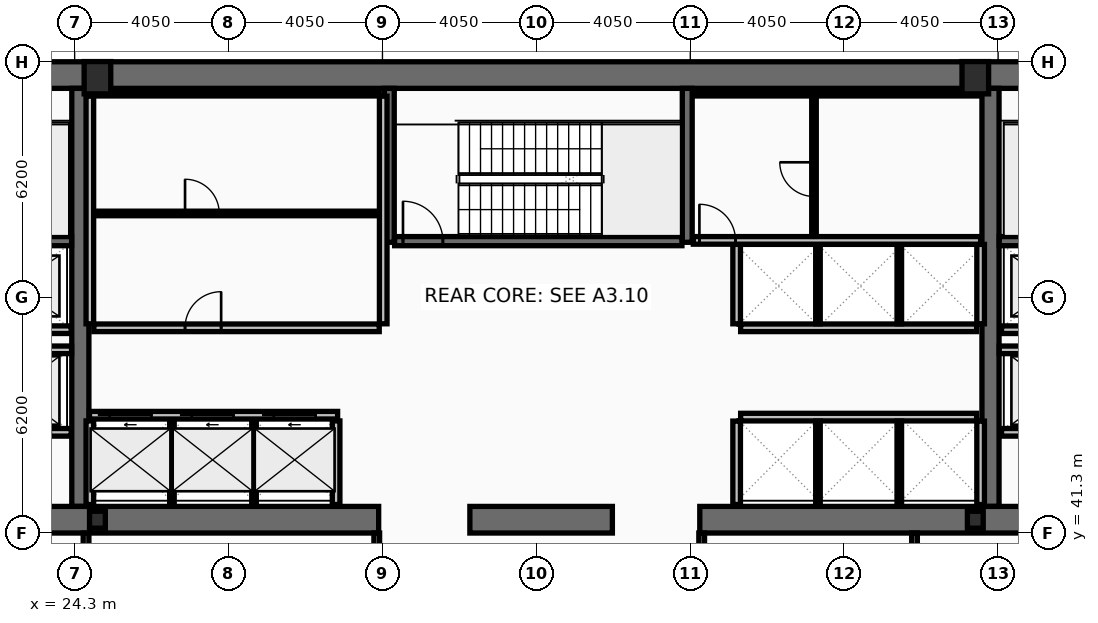
"""IFC4 building model, lengths in metres.
Left out: names, types, materials, properties, quantities, classifications, styles, units other than length and angle.
Written with IfcOpenShell. Run it as: python <this file> out.ifc"""

import sys

from ifc_helpers import new_model, si_unit, direction, frame, frame_2d, origin, origin_2d, place, context, subcontext, project, spatial, rectangle, hollow_rectangle, i_section, extrude, element, fill, save


model = new_model("IFC4")
c1 = context("Model", 3, precision=1e-05, world=origin(), true_north=direction((0.0, 1.0)))
c2 = subcontext(c1, "Body", "Model", "MODEL_VIEW")
j1 = project(units=[si_unit("LENGTHUNIT", "METRE"), si_unit("PLANEANGLEUNIT", "RADIAN")], contexts=[c1])
p1 = place(None, origin())
s1 = spatial("IfcSite", under=j1, at=p1, CompositionType="ELEMENT")
p2 = place(p1, origin())
s2 = spatial("IfcBuilding", under=s1, at=p2, CompositionType="ELEMENT")
p3 = place(p2, frame((0.0, 0.0, 172.2)))
s3 = spatial("IfcBuildingStorey", under=s2, at=p3, CompositionType="ELEMENT", Elevation=172.2)
p4 = place(p3, frame((16.2, 53.35, 0.0), z_axis=(0.0, 0.0, 1.0), x_axis=(1.0, 0.0, 0.0)))
e1 = element("IfcWall", 1, at=p4, inside=s3, PredefinedType="SHEAR", context=c2, shape_type="SweptSolid", body=[
    extrude(rectangle(XDim=40.5, YDim=0.7, at=frame_2d((20.25, 0.0))), origin(), (0.0, 0.0, 1.0), 4.64),
])
for number, where, z_axis, x_axis in (
    (2, (24.45, 42.0, 0.0), (0.0, 0.0, 1.0), (0.0, 1.0, 0.0)),
    (3, (48.4, 42.0, 0.0), (0.0, 0.0, 1.0), (0.0, 1.0, 0.0)),
):
    element("IfcWall", number, at=place(p3, frame(where, z_axis=z_axis, x_axis=x_axis)), inside=s3, PredefinedType="SHEAR", context=c2, shape_type="SweptSolid", body=[
        extrude(rectangle(XDim=11.0, YDim=0.45, at=frame_2d((5.5, 0.0))), origin(), (0.0, 0.0, 1.0), 4.64),
    ])
p5 = place(p3, frame((32.3, 41.65, 0.0), z_axis=(0.0, 0.0, 1.0), x_axis=(-1.0, 0.0, 0.0)))
e4 = element("IfcWall", 4, at=p5, inside=s3, PredefinedType="SHEAR", context=c2, shape_type="SweptSolid", body=[
    extrude(rectangle(XDim=11.45, YDim=0.7, at=frame_2d((5.725, 0.0))), origin(), (0.0, 0.0, 1.0), 4.64),
])
p6 = place(p3, frame((38.45, 41.65, 0.0), z_axis=(0.0, 0.0, 1.0), x_axis=(-1.0, 0.0, 0.0)))
e5 = element("IfcWall", 5, at=p6, inside=s3, PredefinedType="SHEAR", context=c2, shape_type="SweptSolid", body=[
    extrude(rectangle(XDim=3.75, YDim=0.7, at=frame_2d((1.875, 0.0))), origin(), (0.0, 0.0, 1.0), 4.64),
])
p7 = place(p3, frame((52.05, 41.65, 0.0), z_axis=(0.0, 0.0, 1.0), x_axis=(-1.0, 0.0, 0.0)))
e6 = element("IfcWall", 6, at=p7, inside=s3, PredefinedType="SHEAR", context=c2, shape_type="SweptSolid", body=[
    extrude(rectangle(XDim=11.3, YDim=0.7, at=frame_2d((5.65, 0.0))), origin(), (0.0, 0.0, 1.0), 4.64),
])
for number, where, z_axis, x_axis in (
    (7, (32.58, 48.95, 0.0), (0.0, 0.0, 1.0), (0.0, 1.0, 0.0)),
    (8, (40.42, 48.95, 0.0), (0.0, 0.0, 1.0), (0.0, 1.0, 0.0)),
):
    element("IfcWall", number, at=place(p3, frame(where, z_axis=z_axis, x_axis=x_axis)), inside=s3, PredefinedType="SHEAR", context=c2, shape_type="SweptSolid", body=[
        extrude(rectangle(XDim=4.05, YDim=0.26, at=frame_2d((2.025, 0.0))), origin(), (0.0, 0.0, 1.0), 4.64),
    ])
p8 = place(p3, frame((16.9, 48.98, 0.0), z_axis=(0.0, 0.0, 1.0), x_axis=(1.0, 0.0, 0.0)))
e9 = element("IfcWall", 9, at=p8, inside=s3, PredefinedType="SHEAR", context=c2, shape_type="SweptSolid", body=[
    extrude(rectangle(XDim=7.32, YDim=0.24, at=frame_2d((3.66, 0.0))), origin(), (0.0, 0.0, 1.0), 4.64),
])
p9 = place(p8, frame((0.22, 0.0, 0.0)))
e10 = element("IfcOpeningElement", 10, at=p9, cuts=e9, PredefinedType="OPENING", context=c2, shape_type="SweptSolid", body=[
    extrude(rectangle(XDim=1.05, YDim=2.15, at=frame_2d((0.525, 1.075))), frame((0.0, 0.13, 0.0), z_axis=(0.0, -1.0, 0.0), x_axis=(1.0, 0.0, 0.0)), (0.0, 0.0, 1.0), 0.26),
])
p10 = place(p3, frame((48.63, 48.98, 0.0), z_axis=(0.0, 0.0, 1.0), x_axis=(1.0, 0.0, 0.0)))
e11 = element("IfcWall", 11, at=p10, inside=s3, PredefinedType="SHEAR", context=c2, shape_type="SweptSolid", body=[
    extrude(rectangle(XDim=7.37, YDim=0.24, at=frame_2d((3.685, 0.0))), origin(), (0.0, 0.0, 1.0), 4.64),
])
p11 = place(p10, frame((6.1, 0.0, 0.0)))
e12 = element("IfcOpeningElement", 12, at=p11, cuts=e11, PredefinedType="OPENING", context=c2, shape_type="SweptSolid", body=[
    extrude(rectangle(XDim=1.05, YDim=2.15, at=frame_2d((0.525, 1.075))), frame((0.0, 0.13, 0.0), z_axis=(0.0, -1.0, 0.0), x_axis=(1.0, 0.0, 0.0)), (0.0, 0.0, 1.0), 0.26),
])
p12 = place(p3, frame((32.72, 48.98, 0.0), z_axis=(0.0, 0.0, 1.0), x_axis=(1.0, 0.0, 0.0)))
e13 = element("IfcWall", 13, at=p12, inside=s3, PredefinedType="SHEAR", context=c2, shape_type="SweptSolid", body=[
    extrude(rectangle(XDim=7.56, YDim=0.24, at=frame_2d((3.78, 0.0))), origin(), (0.0, 0.0, 1.0), 4.64),
])
p13 = place(p12, frame((0.22, 0.0, 0.0)))
e14 = element("IfcOpeningElement", 14, at=p13, cuts=e13, PredefinedType="OPENING", context=c2, shape_type="SweptSolid", body=[
    extrude(rectangle(XDim=1.05, YDim=2.15, at=frame_2d((0.525, 1.075))), frame((0.0, 0.13, 0.0), z_axis=(0.0, -1.0, 0.0), x_axis=(1.0, 0.0, 0.0)), (0.0, 0.0, 1.0), 0.26),
])
for number, where, z_axis, x_axis in (
    (15, (24.9, 53.28, 0.0), (0.0, 0.0, 1.0), (1.0, 0.0, 0.0)),
    (16, (48.0, 53.28, 0.0), (0.0, 0.0, 1.0), (1.0, 0.0, 0.0)),
):
    element("IfcColumn", number, at=place(p3, frame(where, z_axis=z_axis, x_axis=x_axis)), inside=s3, PredefinedType="COLUMN", context=c2, shape_type="SweptSolid", body=[
        extrude(hollow_rectangle(XDim=0.7, YDim=0.85, WallThickness=0.05, at=origin_2d()), origin(), (0.0, 0.0, 1.0), 4.8),
    ])
for number, where, z_axis, x_axis in (
    (17, (24.9, 41.65, 0.0), (0.0, 0.0, 1.0), (1.0, 0.0, 0.0)),
    (18, (48.0, 41.65, 0.0), (0.0, 0.0, 1.0), (1.0, 0.0, 0.0)),
):
    element("IfcColumn", number, at=place(p3, frame(where, z_axis=z_axis, x_axis=x_axis)), inside=s3, PredefinedType="COLUMN", context=c2, shape_type="SweptSolid", body=[
        extrude(i_section(OverallWidth=0.416, OverallDepth=0.446, WebThickness=0.039, FlangeThickness=0.063, at=origin_2d()), origin(), (0.0, 0.0, 1.0), 4.8),
    ])
p14 = place(p3, frame((24.69, 44.4, 0.0), z_axis=(0.0, 0.0, 1.0), x_axis=(1.0, 0.0, 0.0)))
e19 = element("IfcWall", 19, at=p14, inside=s3, PredefinedType="PARTITIONING", context=c2, shape_type="SweptSolid", body=[
    extrude(rectangle(XDim=6.53, YDim=0.2, at=frame_2d((3.265, 0.0))), origin(), (0.0, 0.0, 1.0), 4.64),
])
p15 = place(p14, frame((0.53, 0.0, 0.0)))
e20 = element("IfcOpeningElement", 20, at=p15, cuts=e19, PredefinedType="OPENING", context=c2, shape_type="SweptSolid", body=[
    extrude(rectangle(XDim=1.1, YDim=2.18, at=frame_2d((0.55, 1.09))), frame((0.0, 0.11, 0.0), z_axis=(0.0, -1.0, 0.0), x_axis=(1.0, 0.0, 0.0)), (0.0, 0.0, 1.0), 0.22),
])
p16 = place(p14, frame((2.69, 0.0, 0.0)))
e21 = element("IfcOpeningElement", 21, at=p16, cuts=e19, PredefinedType="OPENING", context=c2, shape_type="SweptSolid", body=[
    extrude(rectangle(XDim=1.1, YDim=2.18, at=frame_2d((0.55, 1.09))), frame((0.0, 0.11, 0.0), z_axis=(0.0, -1.0, 0.0), x_axis=(1.0, 0.0, 0.0)), (0.0, 0.0, 1.0), 0.22),
])
p17 = place(p14, frame((4.85, 0.0, 0.0)))
e22 = element("IfcOpeningElement", 22, at=p17, cuts=e19, PredefinedType="OPENING", context=c2, shape_type="SweptSolid", body=[
    extrude(rectangle(XDim=1.1, YDim=2.18, at=frame_2d((0.55, 1.09))), frame((0.0, 0.11, 0.0), z_axis=(0.0, -1.0, 0.0), x_axis=(1.0, 0.0, 0.0)), (0.0, 0.0, 1.0), 0.22),
])
p18 = place(p3, frame((51.61, 43.95, 0.0), z_axis=(0.0, 0.0, 1.0), x_axis=(-1.0, 0.0, 0.0)))
e23 = element("IfcWall", 23, at=p18, inside=s3, PredefinedType="PARTITIONING", context=c2, shape_type="SweptSolid", body=[
    extrude(rectangle(XDim=2.92, YDim=0.2, at=frame_2d((1.46, 0.0))), origin(), (0.0, 0.0, 1.0), 4.64),
])
p19 = place(p18, frame((0.81, 0.0, 0.0)))
e24 = element("IfcOpeningElement", 24, at=p19, cuts=e23, PredefinedType="OPENING", context=c2, shape_type="SweptSolid", body=[
    extrude(rectangle(XDim=1.3, YDim=2.18, at=frame_2d((0.65, 1.09))), frame((0.0, 0.11, 0.0), z_axis=(0.0, -1.0, 0.0), x_axis=(1.0, 0.0, 0.0)), (0.0, 0.0, 1.0), 0.22),
])
p20 = place(p3, frame((24.21, 43.95, 0.0), z_axis=(0.0, 0.0, 1.0), x_axis=(-1.0, 0.0, 0.0)))
e25 = element("IfcWall", 25, at=p20, inside=s3, PredefinedType="PARTITIONING", context=c2, shape_type="SweptSolid", body=[
    extrude(rectangle(XDim=2.97, YDim=0.2, at=frame_2d((1.485, 0.0))), origin(), (0.0, 0.0, 1.0), 4.64),
])
p21 = place(p20, frame((0.86, 0.0, 0.0)))
e26 = element("IfcOpeningElement", 26, at=p21, cuts=e25, PredefinedType="OPENING", context=c2, shape_type="SweptSolid", body=[
    extrude(rectangle(XDim=1.3, YDim=2.18, at=frame_2d((0.65, 1.09))), frame((0.0, 0.11, 0.0), z_axis=(0.0, -1.0, 0.0), x_axis=(1.0, 0.0, 0.0)), (0.0, 0.0, 1.0), 0.22),
])
p22 = place(p3, frame((51.61, 46.65, 0.0), z_axis=(0.0, 0.0, 1.0), x_axis=(-1.0, 0.0, 0.0)))
e27 = element("IfcWall", 27, at=p22, inside=s3, PredefinedType="PARTITIONING", context=c2, shape_type="SweptSolid", body=[
    extrude(rectangle(XDim=2.92, YDim=0.2, at=frame_2d((1.46, 0.0))), origin(), (0.0, 0.0, 1.0), 4.64),
])
p23 = place(p22, frame((0.86, 0.0, 0.0)))
e28 = element("IfcOpeningElement", 28, at=p23, cuts=e27, PredefinedType="OPENING", context=c2, shape_type="SweptSolid", body=[
    extrude(rectangle(XDim=1.2, YDim=2.18, at=frame_2d((0.6, 1.09))), frame((0.0, 0.11, 0.0), z_axis=(0.0, -1.0, 0.0), x_axis=(1.0, 0.0, 0.0)), (0.0, 0.0, 1.0), 0.22),
])
p24 = place(p3, frame((24.21, 46.65, 0.0), z_axis=(0.0, 0.0, 1.0), x_axis=(-1.0, 0.0, 0.0)))
e29 = element("IfcWall", 29, at=p24, inside=s3, PredefinedType="PARTITIONING", context=c2, shape_type="SweptSolid", body=[
    extrude(rectangle(XDim=2.97, YDim=0.2, at=frame_2d((1.485, 0.0))), origin(), (0.0, 0.0, 1.0), 4.64),
])
p25 = place(p24, frame((0.91, 0.0, 0.0)))
e30 = element("IfcOpeningElement", 30, at=p25, cuts=e29, PredefinedType="OPENING", context=c2, shape_type="SweptSolid", body=[
    extrude(rectangle(XDim=1.2, YDim=2.18, at=frame_2d((0.6, 1.09))), frame((0.0, 0.11, 0.0), z_axis=(0.0, -1.0, 0.0), x_axis=(1.0, 0.0, 0.0)), (0.0, 0.0, 1.0), 0.22),
])
p26 = place(p3, frame((21.2, 46.12, 0.0), z_axis=(0.0, 0.0, 1.0), x_axis=(1.0, 0.0, 0.0)))
e31 = element("IfcWall", 31, at=p26, inside=s3, PredefinedType="PARTITIONING", context=c2, shape_type="SweptSolid", body=[
    extrude(rectangle(XDim=3.02, YDim=0.2, at=frame_2d((1.51, 0.0))), origin(), (0.0, 0.0, 1.0), 4.64),
])
p27 = place(p3, frame((48.63, 46.12, 0.0), z_axis=(0.0, 0.0, 1.0), x_axis=(1.0, 0.0, 0.0)))
e32 = element("IfcWall", 32, at=p27, inside=s3, PredefinedType="PARTITIONING", context=c2, shape_type="SweptSolid", body=[
    extrude(rectangle(XDim=3.07, YDim=0.2, at=frame_2d((1.535, 0.0))), origin(), (0.0, 0.0, 1.0), 4.64),
])
for number, where, z_axis, x_axis in (
    (33, (24.7, 46.805, 0.0), (0.0, 0.0, 1.0), (0.0, 1.0, 0.0)),
    (34, (32.42, 46.805, 0.0), (0.0, 0.0, 1.0), (0.0, 1.0, 0.0)),
):
    element("IfcWall", number, at=place(p3, frame(where, z_axis=z_axis, x_axis=x_axis)), inside=s3, PredefinedType="PARTITIONING", context=c2, shape_type="SweptSolid", body=[
        extrude(rectangle(XDim=5.99, YDim=0.2, at=frame_2d((2.995, 0.0))), origin(), (0.0, 0.0, 1.0), 4.64),
    ])
p28 = place(p3, frame((24.805, 52.86, 0.0), z_axis=(0.0, 0.0, 1.0), x_axis=(1.0, 0.0, 0.0)))
e35 = element("IfcWall", 35, at=p28, inside=s3, PredefinedType="PARTITIONING", context=c2, shape_type="SweptSolid", body=[
    extrude(rectangle(XDim=7.51, YDim=0.12, at=frame_2d((3.755, 0.0))), origin(), (0.0, 0.0, 1.0), 4.64),
])
p29 = place(p3, frame((24.805, 49.709, 0.0), z_axis=(0.0, 0.0, 1.0), x_axis=(1.0, 0.0, 0.0)))
e36 = element("IfcWall", 36, at=p29, inside=s3, PredefinedType="PARTITIONING", context=c2, shape_type="SweptSolid", body=[
    extrude(rectangle(XDim=7.51, YDim=0.12, at=frame_2d((3.755, 0.0))), origin(), (0.0, 0.0, 1.0), 4.64),
])
p30 = place(p29, frame((2.4, 0.0, 0.0)))
e37 = element("IfcOpeningElement", 37, at=p30, cuts=e36, PredefinedType="OPENING", context=c2, shape_type="SweptSolid", body=[
    extrude(rectangle(XDim=0.9, YDim=2.05, at=frame_2d((0.45, 1.025))), frame((0.0, 0.07, 0.0), z_axis=(0.0, -1.0, 0.0), x_axis=(1.0, 0.0, 0.0)), (0.0, 0.0, 1.0), 0.14),
])
p31 = place(p3, frame((24.805, 46.7, 0.0), z_axis=(0.0, 0.0, 1.0), x_axis=(1.0, 0.0, 0.0)))
e38 = element("IfcWall", 38, at=p31, inside=s3, PredefinedType="PARTITIONING", context=c2, shape_type="SweptSolid", body=[
    extrude(rectangle(XDim=7.51, YDim=0.2, at=frame_2d((3.755, 0.0))), origin(), (0.0, 0.0, 1.0), 4.64),
])
p32 = place(p31, frame((2.4, 0.0, 0.0)))
e39 = element("IfcOpeningElement", 39, at=p32, cuts=e38, PredefinedType="OPENING", context=c2, shape_type="SweptSolid", body=[
    extrude(rectangle(XDim=0.95, YDim=2.1, at=frame_2d((0.475, 1.05))), frame((0.0, 0.11, 0.0), z_axis=(0.0, -1.0, 0.0), x_axis=(1.0, 0.0, 0.0)), (0.0, 0.0, 1.0), 0.22),
])
for number, where, z_axis, x_axis in (
    (40, (24.7, 42.05, 0.0), (0.0, 0.0, 1.0), (0.0, 1.0, 0.0)),
    (41, (31.18, 42.05, 0.0), (0.0, 0.0, 1.0), (0.0, 1.0, 0.0)),
):
    element("IfcWall", number, at=place(p3, frame(where, z_axis=z_axis, x_axis=x_axis)), inside=s3, PredefinedType="PARTITIONING", context=c2, shape_type="SweptSolid", body=[
        extrude(rectangle(XDim=2.2, YDim=0.2, at=frame_2d((1.1, 0.0))), origin(), (0.0, 0.0, 1.0), 4.64),
    ])
for number, where, z_axis, x_axis in (
    (42, (26.86, 42.05, 0.0), (0.0, 0.0, 1.0), (0.0, 1.0, 0.0)),
    (43, (29.02, 42.05, 0.0), (0.0, 0.0, 1.0), (0.0, 1.0, 0.0)),
):
    element("IfcWall", number, at=place(p3, frame(where, z_axis=z_axis, x_axis=x_axis)), inside=s3, PredefinedType="PARTITIONING", context=c2, shape_type="SweptSolid", body=[
        extrude(rectangle(XDim=2.2, YDim=0.12, at=frame_2d((1.1, 0.0))), origin(), (0.0, 0.0, 1.0), 4.64),
    ])
p33 = place(p3, frame((41.825, 46.7, 0.0), z_axis=(0.0, 0.0, 1.0), x_axis=(1.0, 0.0, 0.0)))
e44 = element("IfcWall", 44, at=p33, inside=s3, PredefinedType="PARTITIONING", context=c2, shape_type="SweptSolid", body=[
    extrude(rectangle(XDim=6.21, YDim=0.2, at=frame_2d((3.105, 0.0))), origin(), (0.0, 0.0, 1.0), 4.64),
])
for number, where, z_axis, x_axis in (
    (45, (41.72, 46.805, 0.0), (0.0, 0.0, 1.0), (0.0, 1.0, 0.0)),
    (46, (48.14, 46.805, 0.0), (0.0, 0.0, 1.0), (0.0, 1.0, 0.0)),
):
    element("IfcWall", number, at=place(p3, frame(where, z_axis=z_axis, x_axis=x_axis)), inside=s3, PredefinedType="PARTITIONING", context=c2, shape_type="SweptSolid", body=[
        extrude(rectangle(XDim=2.09, YDim=0.2, at=frame_2d((1.045, 0.0))), origin(), (0.0, 0.0, 1.0), 4.64),
    ])
for number, where, z_axis, x_axis in (
    (47, (43.86, 46.805, 0.0), (0.0, 0.0, 1.0), (0.0, 1.0, 0.0)),
    (48, (46.0, 46.805, 0.0), (0.0, 0.0, 1.0), (0.0, 1.0, 0.0)),
):
    element("IfcWall", number, at=place(p3, frame(where, z_axis=z_axis, x_axis=x_axis)), inside=s3, PredefinedType="PARTITIONING", context=c2, shape_type="SweptSolid", body=[
        extrude(rectangle(XDim=2.09, YDim=0.12, at=frame_2d((1.045, 0.0))), origin(), (0.0, 0.0, 1.0), 4.64),
    ])
p34 = place(p3, frame((41.825, 44.35, 0.0), z_axis=(0.0, 0.0, 1.0), x_axis=(1.0, 0.0, 0.0)))
e49 = element("IfcWall", 49, at=p34, inside=s3, PredefinedType="PARTITIONING", context=c2, shape_type="SweptSolid", body=[
    extrude(rectangle(XDim=6.21, YDim=0.2, at=frame_2d((3.105, 0.0))), origin(), (0.0, 0.0, 1.0), 4.64),
])
for number, where, z_axis, x_axis in (
    (50, (41.72, 42.05, 0.0), (0.0, 0.0, 1.0), (0.0, 1.0, 0.0)),
    (51, (48.14, 42.05, 0.0), (0.0, 0.0, 1.0), (0.0, 1.0, 0.0)),
):
    element("IfcWall", number, at=place(p3, frame(where, z_axis=z_axis, x_axis=x_axis)), inside=s3, PredefinedType="PARTITIONING", context=c2, shape_type="SweptSolid", body=[
        extrude(rectangle(XDim=2.195, YDim=0.2, at=frame_2d((1.098, 0.0))), origin(), (0.0, 0.0, 1.0), 4.64),
    ])
for number, where, z_axis, x_axis in (
    (52, (43.86, 42.05, 0.0), (0.0, 0.0, 1.0), (0.0, 1.0, 0.0)),
    (53, (46.0, 42.05, 0.0), (0.0, 0.0, 1.0), (0.0, 1.0, 0.0)),
):
    element("IfcWall", number, at=place(p3, frame(where, z_axis=z_axis, x_axis=x_axis)), inside=s3, PredefinedType="PARTITIONING", context=c2, shape_type="SweptSolid", body=[
        extrude(rectangle(XDim=2.195, YDim=0.12, at=frame_2d((1.098, 0.0))), origin(), (0.0, 0.0, 1.0), 4.64),
    ])
p35 = place(p3, frame((40.58, 52.86, 0.0), z_axis=(0.0, 0.0, 1.0), x_axis=(1.0, 0.0, 0.0)))
e54 = element("IfcWall", 54, at=p35, inside=s3, PredefinedType="PARTITIONING", context=c2, shape_type="SweptSolid", body=[
    extrude(rectangle(XDim=7.56, YDim=0.12, at=frame_2d((3.78, 0.0))), origin(), (0.0, 0.0, 1.0), 4.64),
])
p36 = place(p3, frame((40.58, 49.0, 0.0), z_axis=(0.0, 0.0, 1.0), x_axis=(1.0, 0.0, 0.0)))
e55 = element("IfcWall", 55, at=p36, inside=s3, PredefinedType="PARTITIONING", context=c2, shape_type="SweptSolid", body=[
    extrude(rectangle(XDim=7.56, YDim=0.2, at=frame_2d((3.78, 0.0))), origin(), (0.0, 0.0, 1.0), 4.64),
])
p37 = place(p36, frame((0.16, 0.0, 0.0)))
e56 = element("IfcOpeningElement", 56, at=p37, cuts=e55, PredefinedType="OPENING", context=c2, shape_type="SweptSolid", body=[
    extrude(rectangle(XDim=0.95, YDim=2.1, at=frame_2d((0.475, 1.05))), frame((0.0, 0.11, 0.0), z_axis=(0.0, -1.0, 0.0), x_axis=(1.0, 0.0, 0.0)), (0.0, 0.0, 1.0), 0.22),
])
p38 = place(p3, frame((43.755, 49.105, 0.0), z_axis=(0.0, 0.0, 1.0), x_axis=(0.0, 1.0, 0.0)))
e57 = element("IfcWall", 57, at=p38, inside=s3, PredefinedType="PARTITIONING", context=c2, shape_type="SweptSolid", body=[
    extrude(rectangle(XDim=3.69, YDim=0.12, at=frame_2d((1.845, 0.0))), origin(), (0.0, 0.0, 1.0), 4.64),
])
p39 = place(p38, frame((1.05, 0.0, 0.0)))
e58 = element("IfcOpeningElement", 58, at=p39, cuts=e57, PredefinedType="OPENING", context=c2, shape_type="SweptSolid", body=[
    extrude(rectangle(XDim=0.9, YDim=2.05, at=frame_2d((0.45, 1.025))), frame((0.0, 0.07, 0.0), z_axis=(0.0, -1.0, 0.0), x_axis=(1.0, 0.0, 0.0)), (0.0, 0.0, 1.0), 0.14),
])
p40 = place(p3, frame((24.6, 38.28, 0.0), z_axis=(0.0, 0.0, 1.0), x_axis=(0.0, 1.0, 0.0)))
e59 = element("IfcWall", 59, at=p40, inside=s3, PredefinedType="PARTITIONING", context=c2, shape_type="SweptSolid", body=[
    extrude(rectangle(XDim=3.02, YDim=0.15, at=frame_2d((1.51, 0.0))), origin(), (0.0, 0.0, 1.0), 3.93),
])
for number, where, z_axis, x_axis in (
    (60, (32.25, 38.28, 0.0), (0.0, 0.0, 1.0), (0.0, 1.0, 0.0)),
    (61, (40.8, 38.28, 0.0), (0.0, 0.0, 1.0), (0.0, 1.0, 0.0)),
    (62, (46.4, 38.28, 0.0), (0.0, 0.0, 1.0), (0.0, 1.0, 0.0)),
):
    element("IfcWall", number, at=place(p3, frame(where, z_axis=z_axis, x_axis=x_axis)), inside=s3, PredefinedType="PARTITIONING", context=c2, shape_type="SweptSolid", body=[
        extrude(rectangle(XDim=3.02, YDim=0.15, at=frame_2d((1.51, 0.0))), origin(), (0.0, 0.0, 1.0), 4.64),
    ])
p41 = place(p13, origin())
e63 = element("IfcDoor", 63, at=p41, inside=s3, OperationType="SINGLE_SWING_LEFT", PredefinedType="DOOR", context=c2, shape_type="SweptSolid", body=[
    extrude(rectangle(XDim=1.05, YDim=2.15, at=frame_2d((0.525, 1.075))), frame((0.0, 0.025, 0.0), z_axis=(0.0, -1.0, 0.0), x_axis=(1.0, 0.0, 0.0)), (0.0, 0.0, 1.0), 0.05),
])
fill(e14, e63)
p42 = place(p15, origin())
e64 = element("IfcDoor", 64, at=p42, inside=s3, OperationType="SLIDING_TO_LEFT", PredefinedType="DOOR", context=c2, shape_type="SweptSolid", body=[
    extrude(rectangle(XDim=1.1, YDim=2.18, at=frame_2d((0.55, 1.09))), frame((0.0, 0.025, 0.0), z_axis=(0.0, -1.0, 0.0), x_axis=(1.0, 0.0, 0.0)), (0.0, 0.0, 1.0), 0.05),
])
fill(e20, e64)
p43 = place(p16, origin())
e65 = element("IfcDoor", 65, at=p43, inside=s3, OperationType="SLIDING_TO_LEFT", PredefinedType="DOOR", context=c2, shape_type="SweptSolid", body=[
    extrude(rectangle(XDim=1.1, YDim=2.18, at=frame_2d((0.55, 1.09))), frame((0.0, 0.025, 0.0), z_axis=(0.0, -1.0, 0.0), x_axis=(1.0, 0.0, 0.0)), (0.0, 0.0, 1.0), 0.05),
])
fill(e21, e65)
p44 = place(p17, origin())
e66 = element("IfcDoor", 66, at=p44, inside=s3, OperationType="SLIDING_TO_LEFT", PredefinedType="DOOR", context=c2, shape_type="SweptSolid", body=[
    extrude(rectangle(XDim=1.1, YDim=2.18, at=frame_2d((0.55, 1.09))), frame((0.0, 0.025, 0.0), z_axis=(0.0, -1.0, 0.0), x_axis=(1.0, 0.0, 0.0)), (0.0, 0.0, 1.0), 0.05),
])
fill(e22, e66)
p45 = place(p30, origin())
e67 = element("IfcDoor", 67, at=p45, inside=s3, OperationType="SINGLE_SWING_LEFT", PredefinedType="DOOR", context=c2, shape_type="SweptSolid", body=[
    extrude(rectangle(XDim=0.9, YDim=2.05, at=frame_2d((0.45, 1.025))), frame((0.0, 0.025, 0.0), z_axis=(0.0, -1.0, 0.0), x_axis=(1.0, 0.0, 0.0)), (0.0, 0.0, 1.0), 0.05),
])
fill(e37, e67)
p46 = place(p32, origin())
e68 = element("IfcDoor", 68, at=p46, inside=s3, OperationType="SINGLE_SWING_RIGHT", PredefinedType="DOOR", context=c2, shape_type="SweptSolid", body=[
    extrude(rectangle(XDim=0.95, YDim=2.1, at=frame_2d((0.475, 1.05))), frame((0.0, 0.025, 0.0), z_axis=(0.0, -1.0, 0.0), x_axis=(1.0, 0.0, 0.0)), (0.0, 0.0, 1.0), 0.05),
])
fill(e39, e68)
p47 = place(p37, origin())
e69 = element("IfcDoor", 69, at=p47, inside=s3, OperationType="SINGLE_SWING_LEFT", PredefinedType="DOOR", context=c2, shape_type="SweptSolid", body=[
    extrude(rectangle(XDim=0.95, YDim=2.1, at=frame_2d((0.475, 1.05))), frame((0.0, 0.025, 0.0), z_axis=(0.0, -1.0, 0.0), x_axis=(1.0, 0.0, 0.0)), (0.0, 0.0, 1.0), 0.05),
])
fill(e56, e69)
p48 = place(p39, origin())
e70 = element("IfcDoor", 70, at=p48, inside=s3, OperationType="SINGLE_SWING_RIGHT", PredefinedType="DOOR", context=c2, shape_type="SweptSolid", body=[
    extrude(rectangle(XDim=0.9, YDim=2.05, at=frame_2d((0.45, 1.025))), frame((0.0, 0.025, 0.0), z_axis=(0.0, -1.0, 0.0), x_axis=(1.0, 0.0, 0.0)), (0.0, 0.0, 1.0), 0.05),
])
fill(e58, e70)
save(model, sys.argv[1])
